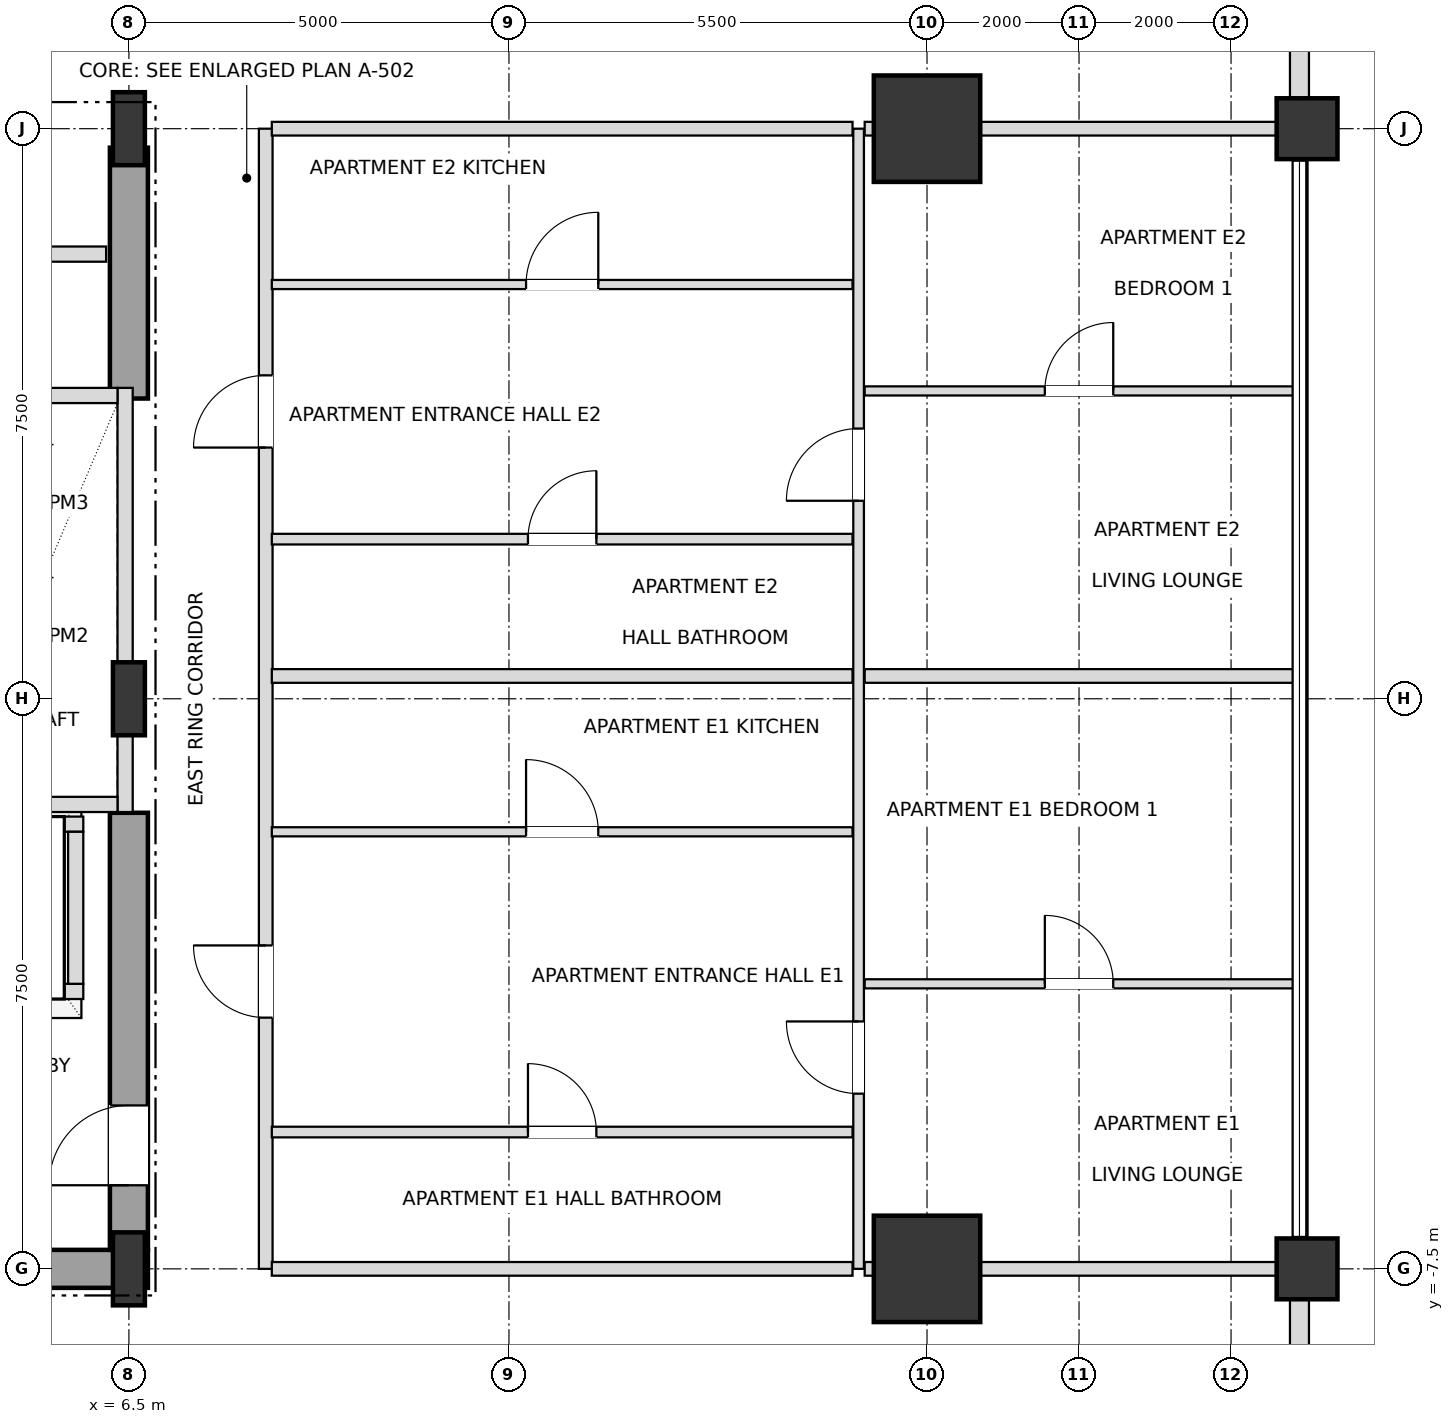
"""IFC4 building model, lengths in metres.
Left out: names, types, materials, properties, quantities, classifications, styles, units other than length and angle.
Written with IfcOpenShell. Run it as: python <this file> out.ifc"""

import sys

from ifc_helpers import new_model, si_unit, direction, frame, frame_2d, origin, origin_2d, place, context, subcontext, project, spatial, rectangle, i_section, extrude, element, fill, save


model = new_model("IFC4")
c1 = context("Model", 3, precision=1e-05, world=origin(), true_north=direction((0.0, 1.0)))
c2 = subcontext(c1, "Body", "Model", "MODEL_VIEW")
j1 = project(units=[si_unit("LENGTHUNIT", "METRE"), si_unit("PLANEANGLEUNIT", "RADIAN")], contexts=[c1])
p1 = place(None, origin())
s1 = spatial("IfcSite", under=j1, at=p1, CompositionType="ELEMENT")
p2 = place(p1, origin())
s2 = spatial("IfcBuilding", under=s1, at=p2, CompositionType="ELEMENT")
p3 = place(p2, frame((0.0, 0.0, 68.4)))
s3 = spatial("IfcBuildingStorey", under=s2, at=p3, CompositionType="ELEMENT", Elevation=68.4)
for number, where, z_axis, x_axis in (
    (1, (6.5, -7.5, 0.0), (0.0, 0.0, 1.0), (1.0, 0.0, 0.0)),
    (2, (6.5, 0.0, 0.0), (0.0, 0.0, 1.0), (1.0, 0.0, 0.0)),
    (3, (6.5, 7.5, 0.0), (0.0, 0.0, 1.0), (1.0, 0.0, 0.0)),
):
    element("IfcColumn", number, at=place(p3, frame(where, z_axis=z_axis, x_axis=x_axis)), inside=s3, PredefinedType="COLUMN", context=c2, shape_type="SweptSolid", body=[
        extrude(i_section(OverallWidth=0.42, OverallDepth=0.96, WebThickness=0.022, FlangeThickness=0.034, at=origin_2d()), origin(), (0.0, 0.0, 1.0), 3.6),
    ])
for number, where, z_axis, x_axis in (
    (4, (17.0, -7.5, 0.0), (0.0, 0.0, 1.0), (1.0, 0.0, 0.0)),
    (5, (17.0, 7.5, 0.0), (0.0, 0.0, 1.0), (1.0, 0.0, 0.0)),
):
    element("IfcColumn", number, at=place(p3, frame(where, z_axis=z_axis, x_axis=x_axis)), inside=s3, PredefinedType="USERDEFINED", context=c2, shape_type="SweptSolid", body=[
        extrude(rectangle(XDim=1.4, YDim=1.4, at=origin_2d()), origin(), (0.0, 0.0, 1.0), 3.6),
    ])
for number, where, z_axis, x_axis in (
    (6, (22.0, -7.5, 0.0), (0.0, 0.0, 1.0), (1.0, 0.0, 0.0)),
    (7, (22.0, 7.5, 0.0), (0.0, 0.0, 1.0), (1.0, 0.0, 0.0)),
):
    element("IfcColumn", number, at=place(p3, frame(where, z_axis=z_axis, x_axis=x_axis)), inside=s3, PredefinedType="COLUMN", context=c2, shape_type="SweptSolid", body=[
        extrude(rectangle(XDim=0.8, YDim=0.8, at=origin_2d()), origin(), (0.0, 0.0, 1.0), 3.6),
    ])
p4 = place(p3, frame((21.9, -12.605, 0.0), z_axis=(0.0, 0.0, 1.0), x_axis=(0.0, 1.0, 0.0)))
e8 = element("IfcWall", 8, at=p4, inside=s3, PredefinedType="SOLIDWALL", context=c2, shape_type="SweptSolid", body=[
    extrude(rectangle(XDim=4.71, YDim=0.25, at=frame_2d((2.355, 0.0))), origin(), (0.0, 0.0, 1.0), 2.736),
])
p5 = place(p4, frame((1.455, 0.0, 0.72)))
e9 = element("IfcOpeningElement", 9, at=p5, cuts=e8, PredefinedType="OPENING", context=c2, shape_type="SweptSolid", body=[
    extrude(rectangle(XDim=1.8, YDim=1.68, at=frame_2d((0.9, 0.84))), frame((0.0, 0.135, 0.0), z_axis=(0.0, -1.0, 0.0), x_axis=(1.0, 0.0, 0.0)), (0.0, 0.0, 1.0), 0.27),
])
p6 = place(p3, frame((21.9, 7.895, 0.0), z_axis=(0.0, 0.0, 1.0), x_axis=(0.0, 1.0, 0.0)))
e10 = element("IfcWall", 10, at=p6, inside=s3, PredefinedType="SOLIDWALL", context=c2, shape_type="SweptSolid", body=[
    extrude(rectangle(XDim=4.71, YDim=0.25, at=frame_2d((2.355, 0.0))), origin(), (0.0, 0.0, 1.0), 2.736),
])
p7 = place(p6, frame((1.455, 0.0, 0.72)))
e11 = element("IfcOpeningElement", 11, at=p7, cuts=e10, PredefinedType="OPENING", context=c2, shape_type="SweptSolid", body=[
    extrude(rectangle(XDim=1.8, YDim=1.68, at=frame_2d((0.9, 0.84))), frame((0.0, 0.135, 0.0), z_axis=(0.0, -1.0, 0.0), x_axis=(1.0, 0.0, 0.0)), (0.0, 0.0, 1.0), 0.27),
])
p8 = place(p3, frame((0.0, -7.5, 0.0), z_axis=(0.0, 0.0, 1.0), x_axis=(1.0, 0.0, 0.0)))
e12 = element("IfcWall", 12, at=p8, inside=s3, PredefinedType="SHEAR", context=c2, shape_type="SweptSolid", body=[
    extrude(rectangle(XDim=6.75, YDim=0.5, at=frame_2d((3.375, 0.0))), origin(), (0.0, 0.0, 1.0), 3.38),
])
p9 = place(p3, frame((6.5, -7.25, 0.0), z_axis=(0.0, 0.0, 1.0), x_axis=(0.0, 1.0, 0.0)))
e13 = element("IfcWall", 13, at=p9, inside=s3, PredefinedType="SHEAR", context=c2, shape_type="SweptSolid", body=[
    extrude(rectangle(XDim=5.75, YDim=0.5, at=frame_2d((2.875, 0.0))), origin(), (0.0, 0.0, 1.0), 3.38),
])
p10 = place(p9, frame((0.85, 0.0, 0.0)))
e14 = element("IfcOpeningElement", 14, at=p10, cuts=e13, PredefinedType="OPENING", context=c2, shape_type="SweptSolid", body=[
    extrude(rectangle(XDim=1.05, YDim=2.15, at=frame_2d((0.525, 1.075))), frame((0.0, 0.26, 0.0), z_axis=(0.0, -1.0, 0.0), x_axis=(1.0, 0.0, 0.0)), (0.0, 0.0, 1.0), 0.52),
])
p11 = place(p3, frame((6.5, 3.95, 0.0), z_axis=(0.0, 0.0, 1.0), x_axis=(0.0, 1.0, 0.0)))
e15 = element("IfcWall", 15, at=p11, inside=s3, PredefinedType="SHEAR", context=c2, shape_type="SweptSolid", body=[
    extrude(rectangle(XDim=3.3, YDim=0.5, at=frame_2d((1.65, 0.0))), origin(), (0.0, 0.0, 1.0), 3.38),
])
p12 = place(p3, frame((6.45, -1.49, 0.0), z_axis=(0.0, 0.0, 1.0), x_axis=(0.0, 1.0, 0.0)))
e16 = element("IfcWall", 16, at=p12, inside=s3, PredefinedType="SOLIDWALL", context=c2, shape_type="SweptSolid", body=[
    extrude(rectangle(XDim=5.58, YDim=0.2, at=frame_2d((2.79, 0.0))), origin(), (0.0, 0.0, 1.0), 2.816),
])
for number, where, z_axis, x_axis in (
    (17, (4.15, -1.39, 0.0), (0.0, 0.0, 1.0), (1.0, 0.0, 0.0)),
    (18, (4.15, 3.99, 0.0), (0.0, 0.0, 1.0), (1.0, 0.0, 0.0)),
):
    element("IfcWall", number, at=place(p3, frame(where, z_axis=z_axis, x_axis=x_axis)), inside=s3, PredefinedType="SOLIDWALL", context=c2, shape_type="SweptSolid", body=[
        extrude(rectangle(XDim=2.2, YDim=0.2, at=frame_2d((1.1, 0.0))), origin(), (0.0, 0.0, 1.0), 3.38),
    ])
p13 = place(p3, frame((1.8, -3.85, 0.0), z_axis=(0.0, 0.0, 1.0), x_axis=(1.0, 0.0, 0.0)))
e19 = element("IfcWall", 19, at=p13, inside=s3, PredefinedType="SOLIDWALL", context=c2, shape_type="SweptSolid", body=[
    extrude(rectangle(XDim=4.1, YDim=0.2, at=frame_2d((2.05, 0.0))), origin(), (0.0, 0.0, 1.0), 3.38),
])
p14 = place(p13, frame((0.45, 0.0, 0.0)))
e20 = element("IfcOpeningElement", 20, at=p14, cuts=e19, PredefinedType="OPENING", context=c2, shape_type="SweptSolid", body=[
    extrude(rectangle(XDim=1.2, YDim=2.2, at=frame_2d((0.6, 1.1))), frame((0.0, 0.11, 0.0), z_axis=(0.0, -1.0, 0.0), x_axis=(1.0, 0.0, 0.0)), (0.0, 0.0, 1.0), 0.22),
])
p15 = place(p13, frame((2.45, 0.0, 0.0)))
e21 = element("IfcOpeningElement", 21, at=p15, cuts=e19, PredefinedType="OPENING", context=c2, shape_type="SweptSolid", body=[
    extrude(rectangle(XDim=1.2, YDim=2.2, at=frame_2d((0.6, 1.1))), frame((0.0, 0.11, 0.0), z_axis=(0.0, -1.0, 0.0), x_axis=(1.0, 0.0, 0.0)), (0.0, 0.0, 1.0), 0.22),
])
p16 = place(p3, frame((1.8, -1.65, 0.0), z_axis=(0.0, 0.0, 1.0), x_axis=(1.0, 0.0, 0.0)))
e22 = element("IfcWall", 22, at=p16, inside=s3, PredefinedType="SOLIDWALL", context=c2, shape_type="SweptSolid", body=[
    extrude(rectangle(XDim=4.1, YDim=0.2, at=frame_2d((2.05, 0.0))), origin(), (0.0, 0.0, 1.0), 3.38),
])
p17 = place(p3, frame((5.8, -3.75, 0.0), z_axis=(0.0, 0.0, 1.0), x_axis=(0.0, 1.0, 0.0)))
e23 = element("IfcWall", 23, at=p17, inside=s3, PredefinedType="SOLIDWALL", context=c2, shape_type="SweptSolid", body=[
    extrude(rectangle(XDim=2.0, YDim=0.2, at=frame_2d((1.0, 0.0))), origin(), (0.0, 0.0, 1.0), 3.38),
])
p18 = place(p3, frame((8.3, -7.5, 0.0), z_axis=(0.0, 0.0, 1.0), x_axis=(0.0, 1.0, 0.0)))
e24 = element("IfcWall", 24, at=p18, inside=s3, PredefinedType="PARTITIONING", context=c2, shape_type="SweptSolid", body=[
    extrude(rectangle(XDim=15.0, YDim=0.18, at=frame_2d((7.5, 0.0))), origin(), (0.0, 0.0, 1.0), 3.38),
])
p19 = place(p18, frame((3.305, 0.0, 0.0)))
e25 = element("IfcOpeningElement", 25, at=p19, cuts=e24, PredefinedType="OPENING", context=c2, shape_type="SweptSolid", body=[
    extrude(rectangle(XDim=0.95, YDim=2.15, at=frame_2d((0.475, 1.075))), frame((0.0, 0.1, 0.0), z_axis=(0.0, -1.0, 0.0), x_axis=(1.0, 0.0, 0.0)), (0.0, 0.0, 1.0), 0.2),
])
p20 = place(p18, frame((10.805, 0.0, 0.0)))
e26 = element("IfcOpeningElement", 26, at=p20, cuts=e24, PredefinedType="OPENING", context=c2, shape_type="SweptSolid", body=[
    extrude(rectangle(XDim=0.95, YDim=2.15, at=frame_2d((0.475, 1.075))), frame((0.0, 0.1, 0.0), z_axis=(0.0, -1.0, 0.0), x_axis=(1.0, 0.0, 0.0)), (0.0, 0.0, 1.0), 0.2),
])
p21 = place(p3, frame((16.1, -7.5, 0.0), z_axis=(0.0, 0.0, 1.0), x_axis=(0.0, 1.0, 0.0)))
e27 = element("IfcWall", 27, at=p21, inside=s3, PredefinedType="PARTITIONING", context=c2, shape_type="SweptSolid", body=[
    extrude(rectangle(XDim=15.0, YDim=0.14, at=frame_2d((7.5, 0.0))), origin(), (0.0, 0.0, 1.0), 3.38),
])
p22 = place(p21, frame((2.305, 0.0, 0.0)))
e28 = element("IfcOpeningElement", 28, at=p22, cuts=e27, PredefinedType="OPENING", context=c2, shape_type="SweptSolid", body=[
    extrude(rectangle(XDim=0.95, YDim=2.1, at=frame_2d((0.475, 1.05))), frame((0.0, 0.08, 0.0), z_axis=(0.0, -1.0, 0.0), x_axis=(1.0, 0.0, 0.0)), (0.0, 0.0, 1.0), 0.16),
])
p23 = place(p21, frame((10.105, 0.0, 0.0)))
e29 = element("IfcOpeningElement", 29, at=p23, cuts=e27, PredefinedType="OPENING", context=c2, shape_type="SweptSolid", body=[
    extrude(rectangle(XDim=0.95, YDim=2.1, at=frame_2d((0.475, 1.05))), frame((0.0, 0.08, 0.0), z_axis=(0.0, -1.0, 0.0), x_axis=(1.0, 0.0, 0.0)), (0.0, 0.0, 1.0), 0.16),
])
p24 = place(p3, frame((8.38, -7.5, 0.0), z_axis=(0.0, 0.0, 1.0), x_axis=(1.0, 0.0, 0.0)))
e30 = element("IfcWall", 30, at=p24, inside=s3, PredefinedType="PARTITIONING", context=c2, shape_type="SweptSolid", body=[
    extrude(rectangle(XDim=7.64, YDim=0.18, at=frame_2d((3.82, 0.0))), origin(), (0.0, 0.0, 1.0), 2.816),
])
p25 = place(p3, frame((16.18, -7.5, 0.0), z_axis=(0.0, 0.0, 1.0), x_axis=(1.0, 0.0, 0.0)))
e31 = element("IfcWall", 31, at=p25, inside=s3, PredefinedType="PARTITIONING", context=c2, shape_type="SweptSolid", body=[
    extrude(rectangle(XDim=5.72, YDim=0.18, at=frame_2d((2.86, 0.0))), origin(), (0.0, 0.0, 1.0), 2.816),
])
p26 = place(p3, frame((8.38, -5.7, 0.0), z_axis=(0.0, 0.0, 1.0), x_axis=(1.0, 0.0, 0.0)))
e32 = element("IfcWall", 32, at=p26, inside=s3, PredefinedType="PARTITIONING", context=c2, shape_type="SweptSolid", body=[
    extrude(rectangle(XDim=7.64, YDim=0.14, at=frame_2d((3.82, 0.0))), origin(), (0.0, 0.0, 1.0), 2.948),
])
p27 = place(p26, frame((3.37, 0.0, 0.0)))
e33 = element("IfcOpeningElement", 33, at=p27, cuts=e32, PredefinedType="OPENING", context=c2, shape_type="SweptSolid", body=[
    extrude(rectangle(XDim=0.9, YDim=2.1, at=frame_2d((0.45, 1.05))), frame((0.0, 0.08, 0.0), z_axis=(0.0, -1.0, 0.0), x_axis=(1.0, 0.0, 0.0)), (0.0, 0.0, 1.0), 0.16),
])
p28 = place(p3, frame((16.18, -3.75, 0.0), z_axis=(0.0, 0.0, 1.0), x_axis=(1.0, 0.0, 0.0)))
e34 = element("IfcWall", 34, at=p28, inside=s3, PredefinedType="PARTITIONING", context=c2, shape_type="SweptSolid", body=[
    extrude(rectangle(XDim=5.64, YDim=0.12, at=frame_2d((2.82, 0.0))), origin(), (0.0, 0.0, 1.0), 2.816),
])
p29 = place(p28, frame((2.37, 0.0, 0.0)))
e35 = element("IfcOpeningElement", 35, at=p29, cuts=e34, PredefinedType="OPENING", context=c2, shape_type="SweptSolid", body=[
    extrude(rectangle(XDim=0.9, YDim=2.1, at=frame_2d((0.45, 1.05))), frame((0.0, 0.07, 0.0), z_axis=(0.0, -1.0, 0.0), x_axis=(1.0, 0.0, 0.0)), (0.0, 0.0, 1.0), 0.14),
])
p30 = place(p3, frame((8.38, -1.75, 0.0), z_axis=(0.0, 0.0, 1.0), x_axis=(1.0, 0.0, 0.0)))
e36 = element("IfcWall", 36, at=p30, inside=s3, PredefinedType="PARTITIONING", context=c2, shape_type="SweptSolid", body=[
    extrude(rectangle(XDim=7.64, YDim=0.12, at=frame_2d((3.82, 0.0))), origin(), (0.0, 0.0, 1.0), 2.948),
])
p31 = place(p30, frame((3.345, 0.0, 0.0)))
e37 = element("IfcOpeningElement", 37, at=p31, cuts=e36, PredefinedType="OPENING", context=c2, shape_type="SweptSolid", body=[
    extrude(rectangle(XDim=0.95, YDim=2.1, at=frame_2d((0.475, 1.05))), frame((0.0, 0.07, 0.0), z_axis=(0.0, -1.0, 0.0), x_axis=(1.0, 0.0, 0.0)), (0.0, 0.0, 1.0), 0.14),
])
p32 = place(p3, frame((8.38, 0.3, 0.0), z_axis=(0.0, 0.0, 1.0), x_axis=(1.0, 0.0, 0.0)))
e38 = element("IfcWall", 38, at=p32, inside=s3, PredefinedType="PARTITIONING", context=c2, shape_type="SweptSolid", body=[
    extrude(rectangle(XDim=7.64, YDim=0.18, at=frame_2d((3.82, 0.0))), origin(), (0.0, 0.0, 1.0), 2.948),
])
p33 = place(p3, frame((16.18, 0.3, 0.0), z_axis=(0.0, 0.0, 1.0), x_axis=(1.0, 0.0, 0.0)))
e39 = element("IfcWall", 39, at=p33, inside=s3, PredefinedType="PARTITIONING", context=c2, shape_type="SweptSolid", body=[
    extrude(rectangle(XDim=5.64, YDim=0.18, at=frame_2d((2.82, 0.0))), origin(), (0.0, 0.0, 1.0), 2.816),
])
p34 = place(p3, frame((8.38, 2.1, 0.0), z_axis=(0.0, 0.0, 1.0), x_axis=(1.0, 0.0, 0.0)))
e40 = element("IfcWall", 40, at=p34, inside=s3, PredefinedType="PARTITIONING", context=c2, shape_type="SweptSolid", body=[
    extrude(rectangle(XDim=7.64, YDim=0.14, at=frame_2d((3.82, 0.0))), origin(), (0.0, 0.0, 1.0), 2.948),
])
p35 = place(p34, frame((3.37, 0.0, 0.0)))
e41 = element("IfcOpeningElement", 41, at=p35, cuts=e40, PredefinedType="OPENING", context=c2, shape_type="SweptSolid", body=[
    extrude(rectangle(XDim=0.9, YDim=2.1, at=frame_2d((0.45, 1.05))), frame((0.0, 0.08, 0.0), z_axis=(0.0, -1.0, 0.0), x_axis=(1.0, 0.0, 0.0)), (0.0, 0.0, 1.0), 0.16),
])
p36 = place(p3, frame((16.18, 4.05, 0.0), z_axis=(0.0, 0.0, 1.0), x_axis=(1.0, 0.0, 0.0)))
e42 = element("IfcWall", 42, at=p36, inside=s3, PredefinedType="PARTITIONING", context=c2, shape_type="SweptSolid", body=[
    extrude(rectangle(XDim=5.64, YDim=0.12, at=frame_2d((2.82, 0.0))), origin(), (0.0, 0.0, 1.0), 2.816),
])
p37 = place(p36, frame((2.37, 0.0, 0.0)))
e43 = element("IfcOpeningElement", 43, at=p37, cuts=e42, PredefinedType="OPENING", context=c2, shape_type="SweptSolid", body=[
    extrude(rectangle(XDim=0.9, YDim=2.1, at=frame_2d((0.45, 1.05))), frame((0.0, 0.07, 0.0), z_axis=(0.0, -1.0, 0.0), x_axis=(1.0, 0.0, 0.0)), (0.0, 0.0, 1.0), 0.14),
])
p38 = place(p3, frame((8.38, 5.45, 0.0), z_axis=(0.0, 0.0, 1.0), x_axis=(1.0, 0.0, 0.0)))
e44 = element("IfcWall", 44, at=p38, inside=s3, PredefinedType="PARTITIONING", context=c2, shape_type="SweptSolid", body=[
    extrude(rectangle(XDim=7.64, YDim=0.12, at=frame_2d((3.82, 0.0))), origin(), (0.0, 0.0, 1.0), 2.948),
])
p39 = place(p38, frame((3.345, 0.0, 0.0)))
e45 = element("IfcOpeningElement", 45, at=p39, cuts=e44, PredefinedType="OPENING", context=c2, shape_type="SweptSolid", body=[
    extrude(rectangle(XDim=0.95, YDim=2.1, at=frame_2d((0.475, 1.05))), frame((0.0, 0.07, 0.0), z_axis=(0.0, -1.0, 0.0), x_axis=(1.0, 0.0, 0.0)), (0.0, 0.0, 1.0), 0.14),
])
p40 = place(p3, frame((4.13, 5.85, 0.0), z_axis=(0.0, 0.0, 1.0), x_axis=(1.0, 0.0, 0.0)))
e46 = element("IfcWall", 46, at=p40, inside=s3, PredefinedType="SOLIDWALL", context=c2, shape_type="SweptSolid", body=[
    extrude(rectangle(XDim=2.07, YDim=0.2, at=frame_2d((1.035, 0.0))), origin(), (0.0, 0.0, 1.0), 3.38),
])
p41 = place(p3, frame((8.38, 7.5, 0.0), z_axis=(0.0, 0.0, 1.0), x_axis=(1.0, 0.0, 0.0)))
e47 = element("IfcWall", 47, at=p41, inside=s3, PredefinedType="PARTITIONING", context=c2, shape_type="SweptSolid", body=[
    extrude(rectangle(XDim=7.64, YDim=0.18, at=frame_2d((3.82, 0.0))), origin(), (0.0, 0.0, 1.0), 2.816),
])
p42 = place(p3, frame((16.18, 7.5, 0.0), z_axis=(0.0, 0.0, 1.0), x_axis=(1.0, 0.0, 0.0)))
e48 = element("IfcWall", 48, at=p42, inside=s3, PredefinedType="PARTITIONING", context=c2, shape_type="SweptSolid", body=[
    extrude(rectangle(XDim=5.72, YDim=0.18, at=frame_2d((2.86, 0.0))), origin(), (0.0, 0.0, 1.0), 2.816),
])
p43 = place(p10, origin())
e49 = element("IfcDoor", 49, at=p43, inside=s3, OperationType="SINGLE_SWING_LEFT", PredefinedType="DOOR", context=c2, shape_type="SweptSolid", body=[
    extrude(rectangle(XDim=1.05, YDim=2.15, at=frame_2d((0.525, 1.075))), frame((0.0, 0.025, 0.0), z_axis=(0.0, -1.0, 0.0), x_axis=(1.0, 0.0, 0.0)), (0.0, 0.0, 1.0), 0.05),
])
fill(e14, e49)
p44 = place(p27, origin())
e50 = element("IfcDoor", 50, at=p44, inside=s3, OperationType="SINGLE_SWING_LEFT", PredefinedType="DOOR", context=c2, shape_type="SweptSolid", body=[
    extrude(rectangle(XDim=0.9, YDim=2.1, at=frame_2d((0.45, 1.05))), frame((0.0, 0.025, 0.0), z_axis=(0.0, -1.0, 0.0), x_axis=(1.0, 0.0, 0.0)), (0.0, 0.0, 1.0), 0.05),
])
fill(e33, e50)
p45 = place(p19, origin())
e51 = element("IfcDoor", 51, at=p45, inside=s3, OperationType="SINGLE_SWING_RIGHT", PredefinedType="DOOR", context=c2, shape_type="SweptSolid", body=[
    extrude(rectangle(XDim=0.95, YDim=2.15, at=frame_2d((0.475, 1.075))), frame((0.0, 0.025, 0.0), z_axis=(0.0, -1.0, 0.0), x_axis=(1.0, 0.0, 0.0)), (0.0, 0.0, 1.0), 0.05),
])
fill(e25, e51)
p46 = place(p31, origin())
e52 = element("IfcDoor", 52, at=p46, inside=s3, OperationType="SINGLE_SWING_LEFT", PredefinedType="DOOR", context=c2, shape_type="SweptSolid", body=[
    extrude(rectangle(XDim=0.95, YDim=2.1, at=frame_2d((0.475, 1.05))), frame((0.0, 0.025, 0.0), z_axis=(0.0, -1.0, 0.0), x_axis=(1.0, 0.0, 0.0)), (0.0, 0.0, 1.0), 0.05),
])
fill(e37, e52)
p47 = place(p22, origin())
e53 = element("IfcDoor", 53, at=p47, inside=s3, OperationType="SINGLE_SWING_RIGHT", PredefinedType="DOOR", context=c2, shape_type="SweptSolid", body=[
    extrude(rectangle(XDim=0.95, YDim=2.1, at=frame_2d((0.475, 1.05))), frame((0.0, 0.025, 0.0), z_axis=(0.0, -1.0, 0.0), x_axis=(1.0, 0.0, 0.0)), (0.0, 0.0, 1.0), 0.05),
])
fill(e28, e53)
p48 = place(p29, origin())
e54 = element("IfcDoor", 54, at=p48, inside=s3, OperationType="SINGLE_SWING_LEFT", PredefinedType="DOOR", context=c2, shape_type="SweptSolid", body=[
    extrude(rectangle(XDim=0.9, YDim=2.1, at=frame_2d((0.45, 1.05))), frame((0.0, 0.025, 0.0), z_axis=(0.0, -1.0, 0.0), x_axis=(1.0, 0.0, 0.0)), (0.0, 0.0, 1.0), 0.05),
])
fill(e35, e54)
p49 = place(p35, origin())
e55 = element("IfcDoor", 55, at=p49, inside=s3, OperationType="SINGLE_SWING_RIGHT", PredefinedType="DOOR", context=c2, shape_type="SweptSolid", body=[
    extrude(rectangle(XDim=0.9, YDim=2.1, at=frame_2d((0.45, 1.05))), frame((0.0, 0.025, 0.0), z_axis=(0.0, -1.0, 0.0), x_axis=(1.0, 0.0, 0.0)), (0.0, 0.0, 1.0), 0.05),
])
fill(e41, e55)
p50 = place(p20, origin())
e56 = element("IfcDoor", 56, at=p50, inside=s3, OperationType="SINGLE_SWING_LEFT", PredefinedType="DOOR", context=c2, shape_type="SweptSolid", body=[
    extrude(rectangle(XDim=0.95, YDim=2.15, at=frame_2d((0.475, 1.075))), frame((0.0, 0.025, 0.0), z_axis=(0.0, -1.0, 0.0), x_axis=(1.0, 0.0, 0.0)), (0.0, 0.0, 1.0), 0.05),
])
fill(e26, e56)
p51 = place(p39, origin())
e57 = element("IfcDoor", 57, at=p51, inside=s3, OperationType="SINGLE_SWING_RIGHT", PredefinedType="DOOR", context=c2, shape_type="SweptSolid", body=[
    extrude(rectangle(XDim=0.95, YDim=2.1, at=frame_2d((0.475, 1.05))), frame((0.0, 0.025, 0.0), z_axis=(0.0, -1.0, 0.0), x_axis=(1.0, 0.0, 0.0)), (0.0, 0.0, 1.0), 0.05),
])
fill(e45, e57)
p52 = place(p23, origin())
e58 = element("IfcDoor", 58, at=p52, inside=s3, OperationType="SINGLE_SWING_LEFT", PredefinedType="DOOR", context=c2, shape_type="SweptSolid", body=[
    extrude(rectangle(XDim=0.95, YDim=2.1, at=frame_2d((0.475, 1.05))), frame((0.0, 0.025, 0.0), z_axis=(0.0, -1.0, 0.0), x_axis=(1.0, 0.0, 0.0)), (0.0, 0.0, 1.0), 0.05),
])
fill(e29, e58)
p53 = place(p37, origin())
e59 = element("IfcDoor", 59, at=p53, inside=s3, OperationType="SINGLE_SWING_RIGHT", PredefinedType="DOOR", context=c2, shape_type="SweptSolid", body=[
    extrude(rectangle(XDim=0.9, YDim=2.1, at=frame_2d((0.45, 1.05))), frame((0.0, 0.025, 0.0), z_axis=(0.0, -1.0, 0.0), x_axis=(1.0, 0.0, 0.0)), (0.0, 0.0, 1.0), 0.05),
])
fill(e43, e59)
save(model, sys.argv[1])
